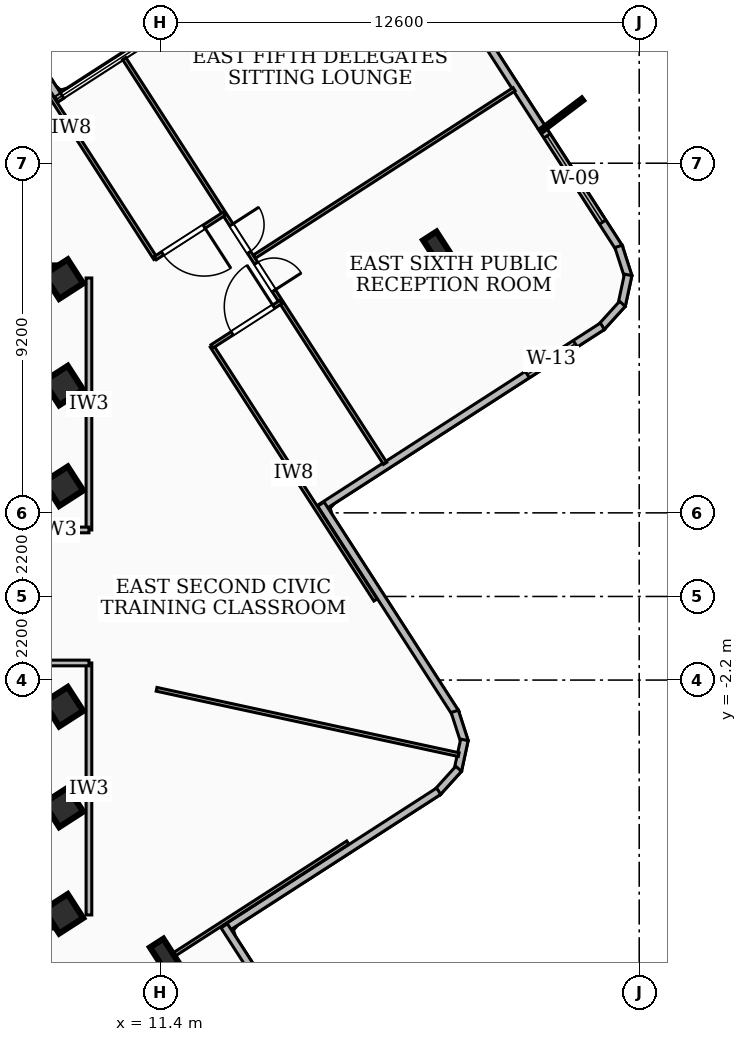
"""IFC4 building model, lengths in metres.
Left out: names, types, materials, properties, quantities, classifications, styles, units other than length and angle.
Written with IfcOpenShell. Run it as: python <this file> out.ifc"""

import sys

from ifc_helpers import new_model, si_unit, direction, frame, frame_2d, origin, origin_2d, place, context, subcontext, project, spatial, rectangle, i_section, extrude, element, fill, save


model = new_model("IFC4")
c1 = context("Model", 3, precision=1e-05, world=origin(), true_north=direction((0.0, 1.0)))
c2 = subcontext(c1, "Body", "Model", "MODEL_VIEW")
j1 = project(units=[si_unit("LENGTHUNIT", "METRE"), si_unit("PLANEANGLEUNIT", "RADIAN")], contexts=[c1])
p1 = place(None, origin())
s1 = spatial("IfcSite", under=j1, at=p1, CompositionType="ELEMENT")
p2 = place(p1, origin())
s2 = spatial("IfcBuilding", under=s1, at=p2, CompositionType="ELEMENT")
p3 = place(p2, frame((0.0, 0.0, 218.88)))
s3 = spatial("IfcBuildingStorey", under=s2, at=p3, CompositionType="ELEMENT", Elevation=218.88)
for number, where, z_axis, x_axis in (
    (1, (-8.78, 8.51, 0.0), (0.0, 0.0, 1.0), (1.0, 0.0, 0.0)),
    (2, (8.78, -8.51, 0.0), (0.0, 0.0, 1.0), (-1.0, 0.0, 0.0)),
):
    element("IfcWall", number, at=place(p3, frame(where, z_axis=z_axis, x_axis=x_axis)), inside=s3, PredefinedType="SHEAR", context=c2, shape_type="SweptSolid", body=[
        extrude(rectangle(XDim=17.56, YDim=0.4, at=frame_2d((8.78, 0.0))), origin(), (0.0, 0.0, 1.0), 3.14),
    ])
for number, where, z_axis, x_axis in (
    (3, (8.85, -5.55, 0.0), (0.0, 0.0, 1.0), (0.841, 0.542, 0.0)),
    (4, (8.85, -2.9, 0.0), (0.0, 0.0, 1.0), (0.841, 0.542, 0.0)),
    (5, (8.85, 2.9, 0.0), (0.0, 0.0, 1.0), (0.841, 0.542, 0.0)),
    (6, (8.85, 5.55, 0.0), (0.0, 0.0, 1.0), (0.841, 0.542, 0.0)),
    (7, (8.85, -8.35, 0.0), (0.0, 0.0, 1.0), (0.841, 0.542, 0.0)),
    (8, (8.85, 8.35, 0.0), (0.0, 0.0, 1.0), (0.841, 0.542, 0.0)),
):
    element("IfcColumn", number, at=place(p3, frame(where, z_axis=z_axis, x_axis=x_axis)), inside=s3, PredefinedType="COLUMN", context=c2, shape_type="SweptSolid", body=[
        extrude(rectangle(XDim=0.75, YDim=0.75, at=origin_2d()), origin(), (0.0, 0.0, 1.0), 3.42),
    ])
for number, where, z_axis, x_axis in (
    (9, (18.741, 9.097, 0.0), (0.0, 0.0, 1.0), (0.841, 0.542, 0.0)),
    (10, (15.234, 14.209, 0.0), (0.0, 0.0, 1.0), (0.841, 0.542, 0.0)),
    (11, (11.554, -9.51, 0.0), (0.0, 0.0, 1.0), (0.841, 0.542, 0.0)),
):
    element("IfcColumn", number, at=place(p3, frame(where, z_axis=z_axis, x_axis=x_axis)), inside=s3, PredefinedType="COLUMN", context=c2, shape_type="SweptSolid", body=[
        extrude(i_section(OverallWidth=0.418, OverallDepth=0.927, WebThickness=0.019, FlangeThickness=0.032, at=origin_2d()), origin(), (0.0, 0.0, 1.0), 3.42),
    ])
p4 = place(p3, frame((5.124, 18.723, 0.0), z_axis=(0.0, 0.0, 1.0), x_axis=(0.541679726821, -0.840584959151, 0.0)))
e12 = element("IfcWall", 12, at=p4, inside=s3, PredefinedType="SOLIDWALL", context=c2, shape_type="SweptSolid", body=[
    extrude(rectangle(XDim=6.742, YDim=0.2, at=frame_2d((3.371, 0.0))), origin(), (0.0, 0.0, 1.0), 3.14),
])
p5 = place(p3, frame((18.155, 17.425, 0.0), z_axis=(0.0, 0.0, 1.0), x_axis=(0.541713039183, -0.840563491462, 0.0)))
e13 = element("IfcWall", 13, at=p5, inside=s3, PredefinedType="SOLIDWALL", context=c2, shape_type="SweptSolid", body=[
    extrude(rectangle(XDim=9.824, YDim=0.2, at=frame_2d((4.912, 0.0))), origin(), (0.0, 0.0, 1.0), 3.14),
])
p6 = place(p5, frame((6.313, 0.0, 0.85)))
e14 = element("IfcOpeningElement", 14, at=p6, cuts=e13, PredefinedType="OPENING", context=c2, shape_type="SweptSolid", body=[
    extrude(rectangle(XDim=2.7, YDim=1.65, at=frame_2d((1.35, 0.825))), frame((0.0, 0.11, 0.0), z_axis=(0.0, -1.0, 0.0), x_axis=(1.0, 0.0, 0.0)), (0.0, 0.0, 1.0), 0.22),
])
p7 = place(p3, frame((23.455, 9.212, 0.0), z_axis=(0.0, 0.0, 1.0), x_axis=(0.306424011446, -0.951895123009, 0.0)))
e15 = element("IfcWall", 15, at=p7, inside=s3, PredefinedType="SOLIDWALL", context=c2, shape_type="SweptSolid", body=[
    extrude(rectangle(XDim=0.838, YDim=0.2, at=frame_2d((0.419, 0.0))), origin(), (0.0, 0.0, 1.0), 3.14),
])
p8 = place(p3, frame((23.709, 8.462, 0.0), z_axis=(0.0, 0.0, 1.0), x_axis=(-0.210237806088, -0.977650277395, 0.0)))
e16 = element("IfcWall", 16, at=p8, inside=s3, PredefinedType="SOLIDWALL", context=c2, shape_type="SweptSolid", body=[
    extrude(rectangle(XDim=0.823, YDim=0.2, at=frame_2d((0.412, 0.0))), origin(), (0.0, 0.0, 1.0), 3.14),
])
p9 = place(p3, frame((23.558, 7.7, 0.0), z_axis=(0.0, 0.0, 1.0), x_axis=(-0.671818647766, -0.740715670493, 0.0)))
e17 = element("IfcWall", 17, at=p9, inside=s3, PredefinedType="SOLIDWALL", context=c2, shape_type="SweptSolid", body=[
    extrude(rectangle(XDim=0.84, YDim=0.2, at=frame_2d((0.42, 0.0))), origin(), (0.0, 0.0, 1.0), 3.14),
])
p10 = place(p3, frame((23.032, 7.111, 0.0), z_axis=(0.0, 0.0, 1.0), x_axis=(-0.840540020681, -0.541749456515, 0.0)))
e18 = element("IfcWall", 18, at=p10, inside=s3, PredefinedType="SOLIDWALL", context=c2, shape_type="SweptSolid", body=[
    extrude(rectangle(XDim=8.842, YDim=0.2, at=frame_2d((4.421, 0.0))), origin(), (0.0, 0.0, 1.0), 3.14),
])
p11 = place(p10, frame((0.85, 0.0, 0.85)))
e19 = element("IfcOpeningElement", 19, at=p11, cuts=e18, PredefinedType="OPENING", context=c2, shape_type="SweptSolid", body=[
    extrude(rectangle(XDim=1.5, YDim=1.8, at=frame_2d((0.75, 0.9))), frame((0.0, 0.11, 0.0), z_axis=(0.0, -1.0, 0.0), x_axis=(1.0, 0.0, 0.0)), (0.0, 0.0, 1.0), 0.22),
])
p12 = place(p3, frame((15.624, 2.431, 0.0), z_axis=(0.0, 0.0, 1.0), x_axis=(0.541715396451, -0.840561972283, 0.0)))
e20 = element("IfcWall", 20, at=p12, inside=s3, PredefinedType="SOLIDWALL", context=c2, shape_type="SweptSolid", body=[
    extrude(rectangle(XDim=6.542, YDim=0.2, at=frame_2d((3.271, 0.0))), origin(), (0.0, 0.0, 1.0), 3.14),
])
p13 = place(p3, frame((19.146, -3.023, 0.0), z_axis=(0.0, 0.0, 1.0), x_axis=(0.306602907463, -0.951837516142, 0.0)))
e21 = element("IfcWall", 21, at=p13, inside=s3, PredefinedType="SOLIDWALL", context=c2, shape_type="SweptSolid", body=[
    extrude(rectangle(XDim=0.838, YDim=0.2, at=frame_2d((0.419, 0.0))), origin(), (0.0, 0.0, 1.0), 3.14),
])
p14 = place(p3, frame((19.4, -3.773, 0.0), z_axis=(0.0, 0.0, 1.0), x_axis=(-0.211087829535, -0.977467098281, 0.0)))
e22 = element("IfcWall", 22, at=p14, inside=s3, PredefinedType="SOLIDWALL", context=c2, shape_type="SweptSolid", body=[
    extrude(rectangle(XDim=0.823, YDim=0.2, at=frame_2d((0.412, 0.0))), origin(), (0.0, 0.0, 1.0), 3.14),
])
p15 = place(p3, frame((19.248, -4.535, 0.0), z_axis=(0.0, 0.0, 1.0), x_axis=(-0.671019988703, -0.741439258983, 0.0)))
e23 = element("IfcWall", 23, at=p15, inside=s3, PredefinedType="SOLIDWALL", context=c2, shape_type="SweptSolid", body=[
    extrude(rectangle(XDim=0.839, YDim=0.2, at=frame_2d((0.419, 0.0))), origin(), (0.0, 0.0, 1.0), 3.14),
])
p16 = place(p3, frame((18.723, -5.124, 0.0), z_axis=(0.0, 0.0, 1.0), x_axis=(-0.840584959151, -0.541679726821, 0.0)))
e24 = element("IfcWall", 24, at=p16, inside=s3, PredefinedType="SOLIDWALL", context=c2, shape_type="SweptSolid", body=[
    extrude(rectangle(XDim=6.742, YDim=0.2, at=frame_2d((3.371, 0.0))), origin(), (0.0, 0.0, 1.0), 3.14),
])
p17 = place(p3, frame((13.08, -8.666, 0.0), z_axis=(0.0, 0.0, 1.0), x_axis=(0.541732711374, -0.840550813114, 0.0)))
e25 = element("IfcWall", 25, at=p17, inside=s3, PredefinedType="SOLIDWALL", context=c2, shape_type="SweptSolid", body=[
    extrude(rectangle(XDim=4.642, YDim=0.2, at=frame_2d((2.321, 0.0))), origin(), (0.0, 0.0, 1.0), 3.14),
])
p18 = place(p3, frame((9.52, 1.75, 0.0), z_axis=(0.0, 0.0, 1.0), x_axis=(0.0, 1.0, 0.0)))
e26 = element("IfcWall", 26, at=p18, inside=s3, PredefinedType="PARTITIONING", context=c2, shape_type="SweptSolid", body=[
    extrude(rectangle(XDim=6.63, YDim=0.15, at=frame_2d((3.315, 0.0))), origin(), (0.0, 0.0, 1.0), 2.51),
])
p19 = place(p3, frame((7.85, 1.75, 0.0), z_axis=(0.0, 0.0, 1.0), x_axis=(1.0, 0.0, 0.0)))
e27 = element("IfcWall", 27, at=p19, inside=s3, PredefinedType="PARTITIONING", context=c2, shape_type="SweptSolid", body=[
    extrude(rectangle(XDim=1.67, YDim=0.15, at=frame_2d((0.835, 0.0))), origin(), (0.0, 0.0, 1.0), 2.37),
])
p20 = place(p3, frame((9.52, -8.38, 0.0), z_axis=(0.0, 0.0, 1.0), x_axis=(0.0, 1.0, 0.0)))
e28 = element("IfcWall", 28, at=p20, inside=s3, PredefinedType="PARTITIONING", context=c2, shape_type="SweptSolid", body=[
    extrude(rectangle(XDim=6.63, YDim=0.15, at=frame_2d((3.315, 0.0))), origin(), (0.0, 0.0, 1.0), 3.14),
])
p21 = place(p3, frame((7.85, -1.75, 0.0), z_axis=(0.0, 0.0, 1.0), x_axis=(1.0, 0.0, 0.0)))
e29 = element("IfcWall", 29, at=p21, inside=s3, PredefinedType="PARTITIONING", context=c2, shape_type="SweptSolid", body=[
    extrude(rectangle(XDim=1.67, YDim=0.15, at=frame_2d((0.835, 0.0))), origin(), (0.0, 0.0, 1.0), 2.37),
])
p22 = place(p3, frame((11.3, -2.443, 0.0), z_axis=(0.0, 0.0, 1.0), x_axis=(0.977411986974, -0.211342867681, 0.0)))
e30 = element("IfcWall", 30, at=p22, inside=s3, PredefinedType="PARTITIONING", context=c2, shape_type="SweptSolid", body=[
    extrude(rectangle(XDim=8.134, YDim=0.1, at=frame_2d((4.067, 0.0))), origin(), (0.0, 0.0, 1.0), 3.14),
])
p23 = place(p3, frame((11.27, 8.893, 0.0), z_axis=(0.0, 0.0, 1.0), x_axis=(-0.541761070726, 0.840532534912, 0.0)))
e31 = element("IfcWall", 31, at=p23, inside=s3, PredefinedType="PARTITIONING", context=c2, shape_type="SweptSolid", body=[
    extrude(rectangle(XDim=8.149, YDim=0.1, at=frame_2d((4.075, 0.0))), origin(), (0.0, 0.0, 1.0), 2.51),
])
p24 = place(p3, frame((17.06, -0.093, 0.0), z_axis=(0.0, 0.0, 1.0), x_axis=(-0.541691689426, 0.840577250232, 0.0)))
e32 = element("IfcWall", 32, at=p24, inside=s3, PredefinedType="PARTITIONING", context=c2, shape_type="SweptSolid", body=[
    extrude(rectangle(XDim=7.949, YDim=0.1, at=frame_2d((3.975, 0.0))), origin(), (0.0, 0.0, 1.0), 3.14),
])
p25 = place(p3, frame((13.08, 10.071, 0.0), z_axis=(0.0, 0.0, 1.0), x_axis=(-0.840623628822, -0.541619714067, 0.0)))
e33 = element("IfcWall", 33, at=p25, inside=s3, PredefinedType="PARTITIONING", context=c2, shape_type="SweptSolid", body=[
    extrude(rectangle(XDim=2.16, YDim=0.1, at=frame_2d((1.08, 0.0))), origin(), (0.0, 0.0, 1.0), 3.14),
])
p26 = place(p25, frame((0.63, 0.0, 0.0)))
e34 = element("IfcOpeningElement", 34, at=p26, cuts=e33, PredefinedType="OPENING", context=c2, shape_type="SweptSolid", body=[
    extrude(rectangle(XDim=1.3, YDim=2.1, at=frame_2d((0.65, 1.05))), frame((0.0, 0.06, 0.0), z_axis=(0.0, -1.0, 0.0), x_axis=(1.0, 0.0, 0.0)), (0.0, 0.0, 1.0), 0.12),
])
p27 = place(p3, frame((12.759, 6.581, 0.0), z_axis=(0.0, 0.0, 1.0), x_axis=(0.840641931508, 0.541591306236, 0.0)))
e35 = element("IfcWall", 35, at=p27, inside=s3, PredefinedType="PARTITIONING", context=c2, shape_type="SweptSolid", body=[
    extrude(rectangle(XDim=2.16, YDim=0.1, at=frame_2d((1.08, 0.0))), origin(), (0.0, 0.0, 1.0), 3.14),
])
p28 = place(p27, frame((0.63, 0.0, 0.0)))
e36 = element("IfcOpeningElement", 36, at=p28, cuts=e35, PredefinedType="OPENING", context=c2, shape_type="SweptSolid", body=[
    extrude(rectangle(XDim=1.3, YDim=2.1, at=frame_2d((0.65, 1.05))), frame((0.0, 0.06, 0.0), z_axis=(0.0, -1.0, 0.0), x_axis=(1.0, 0.0, 0.0)), (0.0, 0.0, 1.0), 0.12),
])
p29 = place(p3, frame((13.878, 8.944, 0.0), z_axis=(0.0, 0.0, 1.0), x_axis=(0.840576508336, 0.541692840671, 0.0)))
e37 = element("IfcWall", 37, at=p29, inside=s3, PredefinedType="PARTITIONING", context=c2, shape_type="SweptSolid", body=[
    extrude(rectangle(XDim=8.124, YDim=0.1, at=frame_2d((4.062, 0.0))), origin(), (0.0, 0.0, 1.0), 2.669),
])
p30 = place(p3, frame((10.449, 14.152, 0.0), z_axis=(0.0, 0.0, 1.0), x_axis=(0.541734007753, -0.8405499776, 0.0)))
e38 = element("IfcWall", 38, at=p30, inside=s3, PredefinedType="PARTITIONING", context=c2, shape_type="SweptSolid", body=[
    extrude(rectangle(XDim=12.67, YDim=0.1, at=frame_2d((6.335, 0.0))), origin(), (0.0, 0.0, 1.0), 2.51),
])
p31 = place(p30, frame((6.405, 0.0, 0.0)))
e39 = element("IfcOpeningElement", 39, at=p31, cuts=e38, PredefinedType="OPENING", context=c2, shape_type="SweptSolid", body=[
    extrude(rectangle(XDim=0.86, YDim=2.04, at=frame_2d((0.43, 1.02))), frame((0.0, 0.06, 0.0), z_axis=(0.0, -1.0, 0.0), x_axis=(1.0, 0.0, 0.0)), (0.0, 0.0, 1.0), 0.12),
])
p32 = place(p30, frame((5.205, 0.0, 0.0)))
e40 = element("IfcOpeningElement", 40, at=p32, cuts=e38, PredefinedType="OPENING", context=c2, shape_type="SweptSolid", body=[
    extrude(rectangle(XDim=0.86, YDim=2.04, at=frame_2d((0.43, 1.02))), frame((0.0, 0.06, 0.0), z_axis=(0.0, -1.0, 0.0), x_axis=(1.0, 0.0, 0.0)), (0.0, 0.0, 1.0), 0.12),
])
p33 = place(p3, frame((16.331, -6.476, 0.0), z_axis=(0.0, 0.0, 1.0), x_axis=(-0.840579457381, -0.541688264437, 0.0)))
e41 = element("IfcWall", 41, at=p33, inside=s3, PredefinedType="PARTITIONING", context=c2, shape_type="SweptSolid", body=[
    extrude(rectangle(XDim=20.238, YDim=0.1, at=frame_2d((10.119, 0.0))), origin(), (0.0, 0.0, 1.0), 2.51),
])
p34 = place(p33, frame((9.619, 0.0, 0.0)))
e42 = element("IfcOpeningElement", 42, at=p34, cuts=e41, PredefinedType="OPENING", context=c2, shape_type="SweptSolid", body=[
    extrude(rectangle(XDim=1.2, YDim=2.1, at=frame_2d((0.6, 1.05))), frame((0.0, 0.06, 0.0), z_axis=(0.0, -1.0, 0.0), x_axis=(1.0, 0.0, 0.0)), (0.0, 0.0, 1.0), 0.12),
])
p35 = place(p6, origin())
e43 = element("IfcWindow", 43, at=p35, inside=s3, PartitioningType="SINGLE_PANEL", PredefinedType="WINDOW", context=c2, shape_type="SweptSolid", body=[
    extrude(rectangle(XDim=2.7, YDim=1.65, at=frame_2d((1.35, 0.825))), frame((0.0, 0.03, 0.0), z_axis=(0.0, -1.0, 0.0), x_axis=(1.0, 0.0, 0.0)), (0.0, 0.0, 1.0), 0.06),
])
fill(e14, e43)
p36 = place(p11, origin())
e44 = element("IfcWindow", 44, at=p36, inside=s3, PartitioningType="SINGLE_PANEL", PredefinedType="WINDOW", context=c2, shape_type="SweptSolid", body=[
    extrude(rectangle(XDim=1.5, YDim=1.8, at=frame_2d((0.75, 0.9))), frame((0.0, 0.03, 0.0), z_axis=(0.0, -1.0, 0.0), x_axis=(1.0, 0.0, 0.0)), (0.0, 0.0, 1.0), 0.06),
])
fill(e19, e44)
p37 = place(p26, origin())
e45 = element("IfcDoor", 45, at=p37, inside=s3, OperationType="SINGLE_SWING_LEFT", PredefinedType="DOOR", context=c2, shape_type="SweptSolid", body=[
    extrude(rectangle(XDim=1.3, YDim=2.1, at=frame_2d((0.65, 1.05))), frame((0.0, 0.025, 0.0), z_axis=(0.0, -1.0, 0.0), x_axis=(1.0, 0.0, 0.0)), (0.0, 0.0, 1.0), 0.05),
])
fill(e34, e45)
p38 = place(p28, origin())
e46 = element("IfcDoor", 46, at=p38, inside=s3, OperationType="SINGLE_SWING_RIGHT", PredefinedType="DOOR", context=c2, shape_type="SweptSolid", body=[
    extrude(rectangle(XDim=1.3, YDim=2.1, at=frame_2d((0.65, 1.05))), frame((0.0, 0.025, 0.0), z_axis=(0.0, -1.0, 0.0), x_axis=(1.0, 0.0, 0.0)), (0.0, 0.0, 1.0), 0.05),
])
fill(e36, e46)
p39 = place(p31, origin())
e47 = element("IfcDoor", 47, at=p39, inside=s3, OperationType="SINGLE_SWING_RIGHT", PredefinedType="DOOR", context=c2, shape_type="SweptSolid", body=[
    extrude(rectangle(XDim=0.86, YDim=2.04, at=frame_2d((0.43, 1.02))), frame((0.0, 0.025, 0.0), z_axis=(0.0, -1.0, 0.0), x_axis=(1.0, 0.0, 0.0)), (0.0, 0.0, 1.0), 0.05),
])
fill(e39, e47)
p40 = place(p32, origin())
e48 = element("IfcDoor", 48, at=p40, inside=s3, OperationType="SINGLE_SWING_LEFT", PredefinedType="DOOR", context=c2, shape_type="SweptSolid", body=[
    extrude(rectangle(XDim=0.86, YDim=2.04, at=frame_2d((0.43, 1.02))), frame((0.0, 0.025, 0.0), z_axis=(0.0, -1.0, 0.0), x_axis=(1.0, 0.0, 0.0)), (0.0, 0.0, 1.0), 0.05),
])
fill(e40, e48)
save(model, sys.argv[1])
